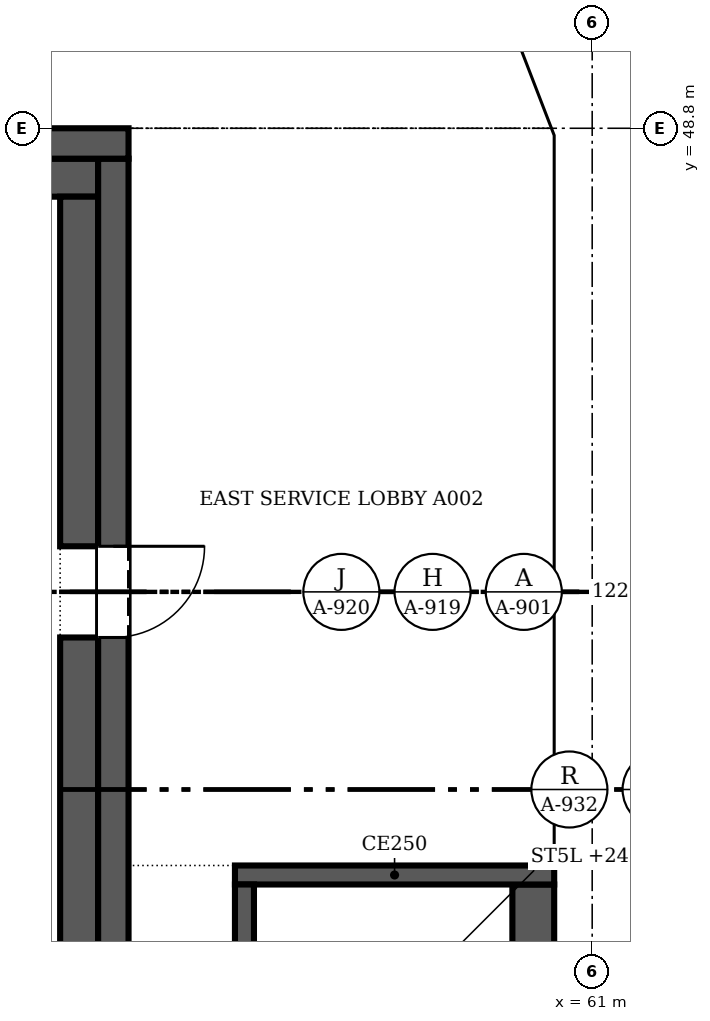
"""IFC4 building model, lengths in metres.
Left out: names, types, materials, properties, quantities, classifications, styles, units other than length and angle.
Written with IfcOpenShell. Run it as: python <this file> out.ifc"""

import sys

from ifc_helpers import new_model, si_unit, direction, frame, frame_2d, origin, place, context, subcontext, project, spatial, polyline, rectangle, outline, extrude, faceted_brep, source, transform, mapped, element, fill, save


model = new_model("IFC4")
c1 = context("Model", 3, precision=1e-05, world=origin(), true_north=direction((0.0, 1.0)))
c2 = subcontext(c1, "Body", "Model", "MODEL_VIEW")
j1 = project(units=[si_unit("LENGTHUNIT", "METRE"), si_unit("PLANEANGLEUNIT", "RADIAN")], contexts=[c1])
p1 = place(None, origin())
s1 = spatial("IfcSite", under=j1, at=p1, CompositionType="ELEMENT")
p2 = place(p1, origin())
s2 = spatial("IfcBuilding", under=s1, at=p2, CompositionType="ELEMENT")
p3 = place(p2, frame((0.0, 0.0, 240.7)))
s3 = spatial("IfcBuildingStorey", under=s2, at=p3, CompositionType="ELEMENT", Elevation=240.7)
m1 = source(origin(), c2, "Body", "Brep", [
    faceted_brep([(3.05, -0.25, 0.0), (6.1, -0.25, 3.8), (6.1, -0.25, 3.8), (3.05, -0.25, 7.6), (0.0, -0.25, 3.8), (0.0, 0.25, 3.8), (3.05, 0.25, 7.6), (6.1, 0.25, 3.8), (6.1, 0.25, 3.8), (3.05, 0.25, 0.0)], [[[0, 1, 2, 3, 4]], [[5, 6, 7, 8, 9]], [[9, 8, 1, 0]], [[7, 6, 3, 2]], [[6, 5, 4, 3]], [[5, 9, 0, 4]], [[1, 8, 7, 2]]]),
])
p4 = place(p3, frame((60.75, 33.55, -3.8), z_axis=(0.0, 0.0, 1.0), x_axis=(0.0, 1.0, 0.0)))
e1 = element("IfcWall", 1, at=p4, inside=s3, PredefinedType="SOLIDWALL", context=c2, shape_type="MappedRepresentation", body=[
    mapped(m1, transform((0.0, 0.0, 0.0), scale=1.0)),
])
m2 = source(origin(), c2, "Body", "SweptSolid", [
    extrude(outline(polyline([(3.05, 0.399), (5.78, 3.8), (3.05, 7.201), (0.321, 3.8), (3.05, 0.399)])), frame((0.0, 0.26, 0.0), z_axis=(0.0, -1.0, 0.0), x_axis=(1.0, 0.0, 0.0)), (0.0, 0.0, 1.0), 0.52),
])
p5 = place(p4, origin())
e2 = element("IfcOpeningElement", 2, at=p5, cuts=e1, PredefinedType="OPENING", context=c2, shape_type="MappedRepresentation", body=[
    mapped(m2, transform((0.0, 0.0, 0.0), scale=1.0)),
])
m3 = source(origin(), c2, "Body", "SweptSolid", [
    extrude(outline(polyline([(3.05, 0.0), (6.1, 3.8), (3.05, 7.6), (0.0, 3.8), (3.05, 0.0)])), frame((0.0, 0.25, 0.0), z_axis=(0.0, -1.0, 0.0), x_axis=(1.0, 0.0, 0.0)), (0.0, 0.0, 1.0), 0.5),
])
p6 = place(p3, frame((60.75, 39.65, -3.8), z_axis=(0.0, 0.0, 1.0), x_axis=(0.0, 1.0, 0.0)))
e3 = element("IfcWall", 3, at=p6, inside=s3, PredefinedType="SOLIDWALL", context=c2, shape_type="MappedRepresentation", body=[
    mapped(m3, transform((0.0, 0.0, 0.0), scale=1.0)),
])
p7 = place(p6, origin())
e4 = element("IfcOpeningElement", 4, at=p7, cuts=e3, PredefinedType="OPENING", context=c2, shape_type="MappedRepresentation", body=[
    mapped(m2, transform((0.0, 0.0, 0.0), scale=1.0)),
])
m4 = source(origin(), c2, "Body", "Brep", [
    faceted_brep([(3.003, -0.25, 0.0), (3.05, -0.25, 0.06), (3.05, -0.25, 7.54), (3.003, -0.25, 7.6), (0.0, -0.25, 3.8), (0.0, 0.25, 3.8), (2.957, 0.25, 7.541), (2.957, 0.25, 0.059), (3.003, 0.0, 0.0), (3.003, 0.0, 7.6)], [[[0, 1, 2, 3, 4]], [[5, 6, 7]], [[1, 0, 8]], [[9, 3, 2]], [[6, 5, 4, 3, 9]], [[5, 7, 8, 0, 4]], [[1, 8, 7, 6, 9, 2]]]),
])
p8 = place(p3, frame((60.75, 45.75, -3.8), z_axis=(0.0, 0.0, 1.0), x_axis=(0.0, 1.0, 0.0)))
e5 = element("IfcWall", 5, at=p8, inside=s3, PredefinedType="SOLIDWALL", context=c2, shape_type="MappedRepresentation", body=[
    mapped(m4, transform((0.0, 0.0, 0.0), scale=1.0)),
])
m5 = source(origin(), c2, "Body", "SweptSolid", [
    extrude(outline(polyline([(2.803, 6.944), (0.319, 3.8), (2.803, 0.656), (2.803, 6.944)])), frame((0.0, 0.26, 0.0), z_axis=(0.0, -1.0, 0.0), x_axis=(1.0, 0.0, 0.0)), (0.0, 0.0, 1.0), 0.52),
])
p9 = place(p8, origin())
e6 = element("IfcOpeningElement", 6, at=p9, cuts=e5, PredefinedType="OPENING", context=c2, shape_type="MappedRepresentation", body=[
    mapped(m5, transform((0.0, 0.0, 0.0), scale=1.0)),
])
m6 = source(origin(), c2, "Body", "Brep", [
    faceted_brep([(0.047, -0.25, 0.0), (2.997, -0.25, 3.8), (0.047, -0.25, 7.6), (0.0, -0.25, 7.541), (0.0, -0.25, 0.059), (0.093, 0.25, 7.54), (2.944, 0.25, 3.868), (2.944, 0.25, 3.732), (0.093, 0.25, 0.06), (2.997, 0.0, 3.8), (0.047, 0.0, 0.0), (0.047, 0.0, 7.6)], [[[0, 1, 2, 3, 4]], [[5, 6, 7, 8]], [[8, 7, 9, 1, 0, 10]], [[6, 5, 11, 2, 1, 9]], [[3, 2, 11]], [[10, 0, 4]], [[8, 10, 4, 3, 11, 5]], [[9, 7, 6]]]),
])
p10 = place(p3, frame((60.767, 48.71, -3.8), z_axis=(0.0, 0.0, 1.0), x_axis=(-0.359901446078, 0.932990326376, 0.0)))
e7 = element("IfcWall", 7, at=p10, inside=s3, PredefinedType="SOLIDWALL", context=c2, shape_type="MappedRepresentation", body=[
    mapped(m6, transform((0.0, 0.0, 0.0), scale=1.0)),
])
m7 = source(origin(), c2, "Body", "SweptSolid", [
    extrude(outline(polyline([(0.247, 0.665), (2.681, 3.8), (0.247, 6.935), (0.247, 0.665)])), frame((0.0, 0.26, 0.0), z_axis=(0.0, -1.0, 0.0), x_axis=(1.0, 0.0, 0.0)), (0.0, 0.0, 1.0), 0.52),
])
p11 = place(p10, origin())
e8 = element("IfcOpeningElement", 8, at=p11, cuts=e7, PredefinedType="OPENING", context=c2, shape_type="MappedRepresentation", body=[
    mapped(m7, transform((0.0, 0.0, 0.0), scale=1.0)),
])
p12 = place(p2, frame((0.0, 0.0, 244.5)))
s4 = spatial("IfcBuildingStorey", under=s2, at=p12, CompositionType="ELEMENT", Elevation=244.5)
p13 = place(p12, frame((60.75, 36.6, -3.8), z_axis=(0.0, 0.0, 1.0), x_axis=(0.0, 1.0, 0.0)))
e9 = element("IfcWall", 9, at=p13, inside=s4, PredefinedType="SOLIDWALL", context=c2, shape_type="MappedRepresentation", body=[
    mapped(m1, transform((0.0, 0.0, 0.0), scale=1.0)),
])
p14 = place(p13, origin())
e10 = element("IfcOpeningElement", 10, at=p14, cuts=e9, PredefinedType="OPENING", context=c2, shape_type="MappedRepresentation", body=[
    mapped(m2, transform((0.0, 0.0, 0.0), scale=1.0)),
])
m8 = source(origin(), c2, "Body", "Brep", [
    faceted_brep([(3.05, -0.25, 0.0), (6.053, -0.25, 3.8), (3.05, -0.25, 7.6), (0.0, -0.25, 3.8), (0.0, 0.25, 3.8), (3.05, 0.25, 7.6), (6.007, 0.25, 3.859), (6.007, 0.25, 3.741), (3.05, 0.25, 0.0), (6.053, 0.0, 3.8)], [[[0, 1, 2, 3]], [[4, 5, 6, 7, 8]], [[8, 7, 9, 1, 0]], [[6, 5, 2, 1, 9]], [[5, 4, 3, 2]], [[4, 8, 0, 3]], [[9, 7, 6]]]),
])
p15 = place(p12, frame((60.75, 42.7, -3.8), z_axis=(0.0, 0.0, 1.0), x_axis=(0.0, 1.0, 0.0)))
e11 = element("IfcWall", 11, at=p15, inside=s4, PredefinedType="SOLIDWALL", context=c2, shape_type="MappedRepresentation", body=[
    mapped(m8, transform((0.0, 0.0, 0.0), scale=1.0)),
])
m9 = source(origin(), c2, "Body", "SweptSolid", [
    extrude(outline(polyline([(3.049, 0.401), (5.735, 3.8), (3.049, 7.199), (0.321, 3.8), (3.049, 0.401)])), frame((0.0, 0.26, 0.0), z_axis=(0.0, -1.0, 0.0), x_axis=(1.0, 0.0, 0.0)), (0.0, 0.0, 1.0), 0.52),
])
p16 = place(p15, origin())
e12 = element("IfcOpeningElement", 12, at=p16, cuts=e11, PredefinedType="OPENING", context=c2, shape_type="MappedRepresentation", body=[
    mapped(m9, transform((0.0, 0.0, 0.0), scale=1.0)),
])
m10 = source(origin(), c2, "Body", "Brep", [
    faceted_brep([(2.95, -0.25, 0.0), (3.003, -0.25, 0.068), (3.003, -0.25, 7.532), (2.95, -0.25, 7.6), (0.0, -0.25, 3.8), (0.047, 0.25, 3.86), (2.898, 0.25, 7.532), (2.898, 0.25, 0.068), (0.047, 0.25, 3.74), (2.95, 0.0, 0.0), (2.95, 0.0, 7.6), (0.0, 0.0, 3.8)], [[[0, 1, 2, 3, 4]], [[5, 6, 7, 8]], [[1, 0, 9]], [[10, 3, 2]], [[6, 5, 11, 4, 3, 10]], [[8, 7, 9, 0, 4, 11]], [[8, 11, 5]], [[1, 9, 7, 6, 10, 2]]]),
])
p17 = place(p12, frame((60.75, 48.753, -3.8), z_axis=(0.0, 0.0, 1.0), x_axis=(-0.35992665181, 0.932980602862, 0.0)))
e13 = element("IfcWall", 13, at=p17, inside=s4, PredefinedType="SOLIDWALL", context=c2, shape_type="MappedRepresentation", body=[
    mapped(m10, transform((0.0, 0.0, 0.0), scale=1.0)),
])
m11 = source(origin(), c2, "Body", "SweptSolid", [
    extrude(outline(polyline([(2.75, 6.935), (0.316, 3.8), (2.75, 0.665), (2.75, 6.935)])), frame((0.0, 0.26, 0.0), z_axis=(0.0, -1.0, 0.0), x_axis=(1.0, 0.0, 0.0)), (0.0, 0.0, 1.0), 0.52),
])
p18 = place(p17, origin())
e14 = element("IfcOpeningElement", 14, at=p18, cuts=e13, PredefinedType="OPENING", context=c2, shape_type="MappedRepresentation", body=[
    mapped(m11, transform((0.0, 0.0, 0.0), scale=1.0)),
])
p19 = place(p3, frame((30.5, 48.6, 0.0), z_axis=(0.0, 0.0, 1.0), x_axis=(1.0, 0.0, 0.0)))
e15 = element("IfcWall", 15, at=p19, inside=s3, PredefinedType="SHEAR", context=c2, shape_type="SweptSolid", body=[
    extrude(rectangle(XDim=24.4, YDim=0.4, at=frame_2d((12.2, 0.0))), origin(), (0.0, 0.0, 1.0), 3.8),
])
p20 = place(p3, frame((54.7, 48.4, 0.0), z_axis=(0.0, 0.0, 1.0), x_axis=(0.0, -1.0, 0.0)))
e16 = element("IfcWall", 16, at=p20, inside=s3, PredefinedType="SHEAR", context=c2, shape_type="SweptSolid", body=[
    extrude(rectangle(XDim=23.6, YDim=0.4, at=frame_2d((11.8, 0.0))), origin(), (0.0, 0.0, 1.0), 3.8),
])
m12 = source(origin(), c2, "Body", "SweptSolid", [
    extrude(rectangle(XDim=1.2, YDim=2.1, at=frame_2d((0.6, 1.05))), frame((0.0, 0.21, 0.0), z_axis=(0.0, -1.0, 0.0), x_axis=(1.0, 0.0, 0.0)), (0.0, 0.0, 1.0), 0.42),
])
p21 = place(p20, frame((5.1, 0.0, 0.0)))
e17 = element("IfcOpeningElement", 17, at=p21, cuts=e16, PredefinedType="OPENING", context=c2, shape_type="MappedRepresentation", body=[
    mapped(m12, transform((0.0, 0.0, 0.0), scale=1.0)),
])
p22 = place(p3, frame((30.9, 48.15, 0.0), z_axis=(0.0, 0.0, 1.0), x_axis=(1.0, 0.0, 0.0)))
e18 = element("IfcWall", 18, at=p22, inside=s3, PredefinedType="SOLIDWALL", context=c2, shape_type="SweptSolid", body=[
    extrude(rectangle(XDim=23.6, YDim=0.5, at=frame_2d((11.8, 0.0))), origin(), (0.0, 0.0, 1.0), 3.8),
])
p23 = place(p3, frame((54.25, 36.88, 0.0), z_axis=(0.0, 0.0, 1.0), x_axis=(0.0, 1.0, 0.0)))
e19 = element("IfcWall", 19, at=p23, inside=s3, PredefinedType="SOLIDWALL", context=c2, shape_type="SweptSolid", body=[
    extrude(rectangle(XDim=5.22, YDim=0.5, at=frame_2d((2.61, 0.0))), origin(), (0.0, 0.0, 1.0), 3.8),
])
p24 = place(p3, frame((54.25, 43.3, 0.0), z_axis=(0.0, 0.0, 1.0), x_axis=(0.0, 1.0, 0.0)))
e20 = element("IfcWall", 20, at=p24, inside=s3, PredefinedType="SOLIDWALL", context=c2, shape_type="SweptSolid", body=[
    extrude(rectangle(XDim=4.6, YDim=0.5, at=frame_2d((2.3, 0.0))), origin(), (0.0, 0.0, 1.0), 3.8),
])
p25 = place(p3, frame((56.425, 30.85, 0.0), z_axis=(0.0, 0.0, 1.0), x_axis=(0.0, 1.0, 0.0)))
e21 = element("IfcWall", 21, at=p25, inside=s3, PredefinedType="SOLIDWALL", context=c2, shape_type="SweptSolid", body=[
    extrude(rectangle(XDim=8.0, YDim=0.25, at=frame_2d((4.0, 0.0))), origin(), (0.0, 0.0, 1.0), 3.8),
])
p26 = place(p3, frame((56.3, 38.975, 0.0), z_axis=(0.0, 0.0, 1.0), x_axis=(1.0, 0.0, 0.0)))
e22 = element("IfcWall", 22, at=p26, inside=s3, PredefinedType="SOLIDWALL", context=c2, shape_type="SweptSolid", body=[
    extrude(rectangle(XDim=4.2, YDim=0.25, at=frame_2d((2.1, 0.0))), origin(), (0.0, 0.0, 1.0), 3.8),
])
p27 = place(p3, frame((60.225, 38.85, 0.0), z_axis=(0.0, 0.0, 1.0), x_axis=(0.0, -1.0, 0.0)))
e23 = element("IfcWall", 23, at=p27, inside=s3, PredefinedType="SOLIDWALL", context=c2, shape_type="SweptSolid", body=[
    extrude(rectangle(XDim=8.0, YDim=0.55, at=frame_2d((4.0, 0.0))), origin(), (0.0, 0.0, 1.0), 3.8),
])
m13 = source(origin(), c2, "Body", "SweptSolid", [
    extrude(rectangle(XDim=1.2, YDim=2.1, at=frame_2d((0.6, 1.05))), frame((0.0, 0.025, 0.0), z_axis=(0.0, -1.0, 0.0), x_axis=(1.0, 0.0, 0.0)), (0.0, 0.0, 1.0), 0.05),
])
p28 = place(p21, origin())
e24 = element("IfcDoor", 24, at=p28, inside=s3, OperationType="SINGLE_SWING_LEFT", PredefinedType="DOOR", context=c2, shape_type="MappedRepresentation", body=[
    mapped(m13, transform((0.0, 0.0, 0.0), scale=1.0)),
])
fill(e17, e24)
save(model, sys.argv[1])
